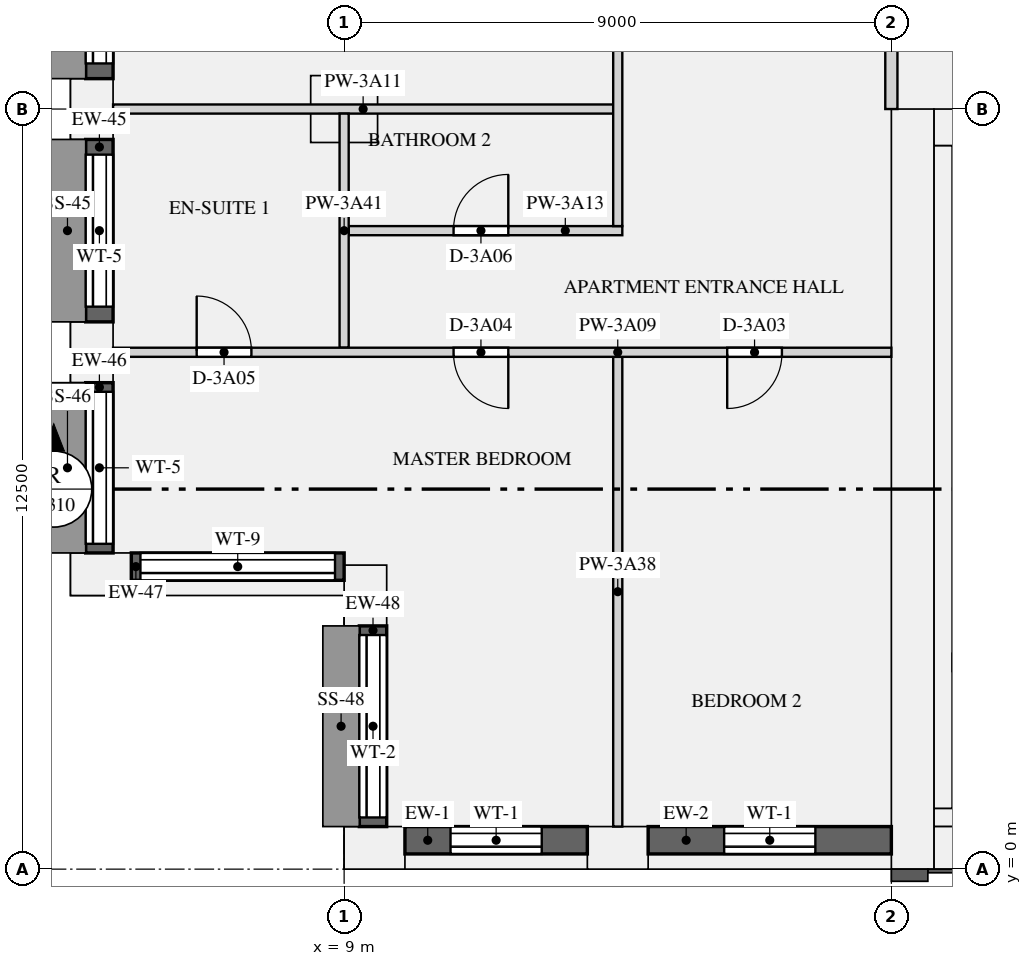
"""IFC4 building model, lengths in metres.
Left out: names, types, materials, properties, quantities, classifications, styles, units other than length and angle.
Written with IfcOpenShell. Run it as: python <this file> out.ifc"""

import sys

from ifc_helpers import new_model, si_unit, direction, frame, frame_2d, origin, origin_2d, place, context, subcontext, project, spatial, rectangle, extrude, element, fill, save


model = new_model("IFC4")
c1 = context("Model", 3, precision=1e-05, world=origin(), true_north=direction((0.0, 1.0)))
c2 = subcontext(c1, "Body", "Model", "MODEL_VIEW")
j1 = project(units=[si_unit("LENGTHUNIT", "METRE"), si_unit("PLANEANGLEUNIT", "RADIAN")], contexts=[c1])
p1 = place(None, origin())
s1 = spatial("IfcSite", under=j1, at=p1, CompositionType="ELEMENT")
p2 = place(p1, origin())
s2 = spatial("IfcBuilding", under=s1, at=p2, CompositionType="ELEMENT")
p3 = place(p2, frame((0.0, 0.0, 144.45)))
s3 = spatial("IfcBuildingStorey", under=s2, at=p3, CompositionType="ELEMENT", Elevation=144.45)
for number, where, z_axis, x_axis in (
    (1, (9.5, 0.35, 0.0), (0.0, 0.0, 1.0), (1.0, 0.0, 0.0)),
    (2, (13.5, 0.35, 0.0), (0.0, 0.0, 1.0), (1.0, 0.0, 0.0)),
    (3, (4.85, 12.5, 0.0), (0.0, 0.0, 1.0), (0.0, -1.0, 0.0)),
    (4, (4.85, 8.5, 0.0), (0.0, 0.0, 1.0), (0.0, -1.0, 0.0)),
    (5, (5.0, 4.85, 0.0), (0.0, 0.0, 1.0), (1.0, 0.0, 0.0)),
    (6, (9.35, 4.5, 0.0), (0.0, 0.0, 1.0), (0.0, -1.0, 0.0)),
):
    element("IfcColumn", number, at=place(p3, frame(where, z_axis=z_axis, x_axis=x_axis)), inside=s3, PredefinedType="USERDEFINED", context=c2, shape_type="SweptSolid", body=[
        extrude(rectangle(XDim=1.0, YDim=0.7, at=origin_2d()), origin(), (0.0, 0.0, 1.0), 3.15),
    ])
p4 = place(p3, frame((9.0, 12.5, 0.0), z_axis=(0.0, 0.0, 1.0), x_axis=(1.0, 0.0, 0.0)))
e7 = element("IfcColumn", 7, at=p4, inside=s3, PredefinedType="COLUMN", context=c2, shape_type="SweptSolid", body=[
    extrude(rectangle(XDim=1.1, YDim=1.1, at=origin_2d()), origin(), (0.0, 0.0, 1.0), 3.15),
])
p5 = place(p3, frame((18.35, 0.0, 0.0), z_axis=(0.0, 0.0, 1.0), x_axis=(0.0, 1.0, 0.0)))
e8 = element("IfcWall", 8, at=p5, inside=s3, PredefinedType="SHEAR", context=c2, shape_type="SweptSolid", body=[
    extrude(rectangle(XDim=12.5, YDim=0.7, at=frame_2d((6.25, 0.0))), origin(), (0.0, 0.0, 1.0), 3.15),
])
p6 = place(p3, frame((18.7, 0.35, 0.0), z_axis=(0.0, 0.0, 1.0), x_axis=(1.0, 0.0, 0.0)))
e9 = element("IfcWall", 9, at=p6, inside=s3, PredefinedType="SHEAR", context=c2, shape_type="SweptSolid", body=[
    extrude(rectangle(XDim=34.6, YDim=0.7, at=frame_2d((17.3, 0.0))), origin(), (0.0, 0.0, 1.0), 3.15),
])
p7 = place(p3, frame((18.7, 12.2, 0.0), z_axis=(0.0, 0.0, 1.0), x_axis=(1.0, 0.0, 0.0)))
e10 = element("IfcWall", 10, at=p7, inside=s3, PredefinedType="SHEAR", context=c2, shape_type="SweptSolid", body=[
    extrude(rectangle(XDim=34.6, YDim=0.6, at=frame_2d((17.3, 0.0))), origin(), (0.0, 0.0, 1.0), 3.15),
])
p8 = place(p7, frame((24.475, 0.0, 0.0)))
e11 = element("IfcOpeningElement", 11, at=p8, cuts=e10, PredefinedType="OPENING", context=c2, shape_type="SweptSolid", body=[
    extrude(rectangle(XDim=1.1, YDim=2.1, at=frame_2d((0.55, 1.05))), frame((0.0, 0.31, 0.0), z_axis=(0.0, -1.0, 0.0), x_axis=(1.0, 0.0, 0.0)), (0.0, 0.0, 1.0), 0.62),
])
p9 = place(p7, frame((26.725, 0.0, 0.0)))
e12 = element("IfcOpeningElement", 12, at=p9, cuts=e10, PredefinedType="OPENING", context=c2, shape_type="SweptSolid", body=[
    extrude(rectangle(XDim=1.1, YDim=2.1, at=frame_2d((0.55, 1.05))), frame((0.0, 0.31, 0.0), z_axis=(0.0, -1.0, 0.0), x_axis=(1.0, 0.0, 0.0)), (0.0, 0.0, 1.0), 0.62),
])
p10 = place(p7, frame((28.975, 0.0, 0.0)))
e13 = element("IfcOpeningElement", 13, at=p10, cuts=e10, PredefinedType="OPENING", context=c2, shape_type="SweptSolid", body=[
    extrude(rectangle(XDim=1.1, YDim=2.1, at=frame_2d((0.55, 1.05))), frame((0.0, 0.31, 0.0), z_axis=(0.0, -1.0, 0.0), x_axis=(1.0, 0.0, 0.0)), (0.0, 0.0, 1.0), 0.62),
])
p11 = place(p7, frame((14.35, 0.0, 0.0)))
e14 = element("IfcOpeningElement", 14, at=p11, cuts=e10, PredefinedType="OPENING", context=c2, shape_type="SweptSolid", body=[
    extrude(rectangle(XDim=0.9, YDim=2.1, at=frame_2d((0.45, 1.05))), frame((0.0, 0.31, 0.0), z_axis=(0.0, -1.0, 0.0), x_axis=(1.0, 0.0, 0.0)), (0.0, 0.0, 1.0), 0.62),
])
p12 = place(p7, frame((1.45, 0.0, 0.0)))
e15 = element("IfcOpeningElement", 15, at=p12, cuts=e10, PredefinedType="OPENING", context=c2, shape_type="SweptSolid", body=[
    extrude(rectangle(XDim=1.2, YDim=2.1, at=frame_2d((0.6, 1.05))), frame((0.0, 0.31, 0.0), z_axis=(0.0, -1.0, 0.0), x_axis=(1.0, 0.0, 0.0)), (0.0, 0.0, 1.0), 0.62),
])
p13 = place(p7, frame((31.95, 0.0, 0.0)))
e16 = element("IfcOpeningElement", 16, at=p13, cuts=e10, PredefinedType="OPENING", context=c2, shape_type="SweptSolid", body=[
    extrude(rectangle(XDim=1.2, YDim=2.1, at=frame_2d((0.6, 1.05))), frame((0.0, 0.31, 0.0), z_axis=(0.0, -1.0, 0.0), x_axis=(1.0, 0.0, 0.0)), (0.0, 0.0, 1.0), 0.62),
])
p14 = place(p3, frame((18.85, 1.0, 0.0), z_axis=(0.0, 0.0, 1.0), x_axis=(0.0, 1.0, 0.0)))
e17 = element("IfcWall", 17, at=p14, inside=s3, PredefinedType="SHEAR", context=c2, shape_type="SweptSolid", body=[
    extrude(rectangle(XDim=10.9, YDim=0.3, at=frame_2d((5.45, 0.0))), origin(), (0.0, 0.0, 1.0), 3.15),
])
p15 = place(p3, frame((18.7, 0.85, 0.0), z_axis=(0.0, 0.0, 1.0), x_axis=(1.0, 0.0, 0.0)))
e18 = element("IfcWall", 18, at=p15, inside=s3, PredefinedType="SHEAR", context=c2, shape_type="SweptSolid", body=[
    extrude(rectangle(XDim=34.6, YDim=0.3, at=frame_2d((17.3, 0.0))), origin(), (0.0, 0.0, 1.0), 3.15),
])
p16 = place(p3, frame((19.0, 3.4, 0.0), z_axis=(0.0, 0.0, 1.0), x_axis=(1.0, 0.0, 0.0)))
e19 = element("IfcWall", 19, at=p16, inside=s3, PredefinedType="SHEAR", context=c2, shape_type="SweptSolid", body=[
    extrude(rectangle(XDim=2.55, YDim=0.3, at=frame_2d((1.275, 0.0))), origin(), (0.0, 0.0, 1.0), 3.15),
])
p17 = place(p16, frame((0.675, 0.0, 0.0)))
e20 = element("IfcOpeningElement", 20, at=p17, cuts=e19, PredefinedType="OPENING", context=c2, shape_type="SweptSolid", body=[
    extrude(rectangle(XDim=1.2, YDim=2.1, at=frame_2d((0.6, 1.05))), frame((0.0, 0.16, 0.0), z_axis=(0.0, -1.0, 0.0), x_axis=(1.0, 0.0, 0.0)), (0.0, 0.0, 1.0), 0.32),
])
p18 = place(p3, frame((10.0, 0.475, 0.9), z_axis=(0.0, 0.0, 1.0), x_axis=(1.0, 0.0, 0.0)))
e21 = element("IfcWall", 21, at=p18, inside=s3, PredefinedType="SOLIDWALL", context=c2, shape_type="SweptSolid", body=[
    extrude(rectangle(XDim=3.0, YDim=0.45, at=frame_2d((1.5, 0.0))), origin(), (0.0, 0.0, 1.0), 1.93),
])
p19 = place(p18, frame((0.75, 0.0, 0.15)))
e22 = element("IfcOpeningElement", 22, at=p19, cuts=e21, PredefinedType="OPENING", context=c2, shape_type="SweptSolid", body=[
    extrude(rectangle(XDim=1.5, YDim=1.5, at=frame_2d((0.75, 0.75))), frame((0.0, 0.235, 0.0), z_axis=(0.0, -1.0, 0.0), x_axis=(1.0, 0.0, 0.0)), (0.0, 0.0, 1.0), 0.47),
])
p20 = place(p3, frame((14.0, 0.475, 0.9), z_axis=(0.0, 0.0, 1.0), x_axis=(1.0, 0.0, 0.0)))
e23 = element("IfcWall", 23, at=p20, inside=s3, PredefinedType="SOLIDWALL", context=c2, shape_type="SweptSolid", body=[
    extrude(rectangle(XDim=4.0, YDim=0.45, at=frame_2d((2.0, 0.0))), origin(), (0.0, 0.0, 1.0), 1.93),
])
p21 = place(p20, frame((1.25, 0.0, 0.15)))
e24 = element("IfcOpeningElement", 24, at=p21, cuts=e23, PredefinedType="OPENING", context=c2, shape_type="SweptSolid", body=[
    extrude(rectangle(XDim=1.5, YDim=1.5, at=frame_2d((0.75, 0.75))), frame((0.0, 0.235, 0.0), z_axis=(0.0, -1.0, 0.0), x_axis=(1.0, 0.0, 0.0)), (0.0, 0.0, 1.0), 0.47),
])
p22 = place(p3, frame((4.975, 15.5, 0.9), z_axis=(0.0, 0.0, 1.0), x_axis=(0.0, -1.0, 0.0)))
e25 = element("IfcWall", 25, at=p22, inside=s3, PredefinedType="SOLIDWALL", context=c2, shape_type="SweptSolid", body=[
    extrude(rectangle(XDim=2.5, YDim=0.45, at=frame_2d((1.25, 0.0))), origin(), (0.0, 0.0, 1.0), 1.93),
])
p23 = place(p22, frame((0.25, 0.0, 0.15)))
e26 = element("IfcOpeningElement", 26, at=p23, cuts=e25, PredefinedType="OPENING", context=c2, shape_type="SweptSolid", body=[
    extrude(rectangle(XDim=2.0, YDim=1.5, at=frame_2d((1.0, 0.75))), frame((0.0, 0.235, 0.0), z_axis=(0.0, -1.0, 0.0), x_axis=(1.0, 0.0, 0.0)), (0.0, 0.0, 1.0), 0.47),
])
p24 = place(p3, frame((4.975, 12.0, 0.9), z_axis=(0.0, 0.0, 1.0), x_axis=(0.0, -1.0, 0.0)))
e27 = element("IfcWall", 27, at=p24, inside=s3, PredefinedType="SOLIDWALL", context=c2, shape_type="SweptSolid", body=[
    extrude(rectangle(XDim=3.0, YDim=0.45, at=frame_2d((1.5, 0.0))), origin(), (0.0, 0.0, 1.0), 1.93),
])
p25 = place(p24, frame((0.25, 0.0, 0.15)))
e28 = element("IfcOpeningElement", 28, at=p25, cuts=e27, PredefinedType="OPENING", context=c2, shape_type="SweptSolid", body=[
    extrude(rectangle(XDim=2.5, YDim=1.5, at=frame_2d((1.25, 0.75))), frame((0.0, 0.235, 0.0), z_axis=(0.0, -1.0, 0.0), x_axis=(1.0, 0.0, 0.0)), (0.0, 0.0, 1.0), 0.47),
])
p26 = place(p3, frame((4.975, 8.0, 0.9), z_axis=(0.0, 0.0, 1.0), x_axis=(0.0, -1.0, 0.0)))
e29 = element("IfcWall", 29, at=p26, inside=s3, PredefinedType="SOLIDWALL", context=c2, shape_type="SweptSolid", body=[
    extrude(rectangle(XDim=2.8, YDim=0.45, at=frame_2d((1.4, 0.0))), origin(), (0.0, 0.0, 1.0), 1.93),
])
p27 = place(p26, frame((0.15, 0.0, 0.15)))
e30 = element("IfcOpeningElement", 30, at=p27, cuts=e29, PredefinedType="OPENING", context=c2, shape_type="SweptSolid", body=[
    extrude(rectangle(XDim=2.5, YDim=1.5, at=frame_2d((1.25, 0.75))), frame((0.0, 0.235, 0.0), z_axis=(0.0, -1.0, 0.0), x_axis=(1.0, 0.0, 0.0)), (0.0, 0.0, 1.0), 0.47),
])
p28 = place(p3, frame((5.5, 4.975, 0.9), z_axis=(0.0, 0.0, 1.0), x_axis=(1.0, 0.0, 0.0)))
e31 = element("IfcWall", 31, at=p28, inside=s3, PredefinedType="SOLIDWALL", context=c2, shape_type="SweptSolid", body=[
    extrude(rectangle(XDim=3.5, YDim=0.45, at=frame_2d((1.75, 0.0))), origin(), (0.0, 0.0, 1.0), 1.93),
])
p29 = place(p28, frame((0.15, 0.0, 0.15)))
e32 = element("IfcOpeningElement", 32, at=p29, cuts=e31, PredefinedType="OPENING", context=c2, shape_type="SweptSolid", body=[
    extrude(rectangle(XDim=3.2, YDim=1.5, at=frame_2d((1.6, 0.75))), frame((0.0, 0.235, 0.0), z_axis=(0.0, -1.0, 0.0), x_axis=(1.0, 0.0, 0.0)), (0.0, 0.0, 1.0), 0.47),
])
p30 = place(p3, frame((9.475, 4.0, 0.9), z_axis=(0.0, 0.0, 1.0), x_axis=(0.0, -1.0, 0.0)))
e33 = element("IfcWall", 33, at=p30, inside=s3, PredefinedType="SOLIDWALL", context=c2, shape_type="SweptSolid", body=[
    extrude(rectangle(XDim=3.3, YDim=0.45, at=frame_2d((1.65, 0.0))), origin(), (0.0, 0.0, 1.0), 1.93),
])
p31 = place(p30, frame((0.15, 0.0, 0.15)))
e34 = element("IfcOpeningElement", 34, at=p31, cuts=e33, PredefinedType="OPENING", context=c2, shape_type="SweptSolid", body=[
    extrude(rectangle(XDim=3.0, YDim=1.5, at=frame_2d((1.5, 0.75))), frame((0.0, 0.235, 0.0), z_axis=(0.0, -1.0, 0.0), x_axis=(1.0, 0.0, 0.0)), (0.0, 0.0, 1.0), 0.47),
])
p32 = place(p3, frame((18.0, 12.5, 0.0), z_axis=(0.0, 0.0, 1.0), x_axis=(0.0, 1.0, 0.0)))
e35 = element("IfcWall", 35, at=p32, inside=s3, PredefinedType="PARTITIONING", context=c2, shape_type="SweptSolid", body=[
    extrude(rectangle(XDim=3.4, YDim=0.2, at=frame_2d((1.7, 0.0))), origin(), (0.0, 0.0, 1.0), 2.83),
])
p33 = place(p3, frame((5.2, 8.5, 0.0), z_axis=(0.0, 0.0, 1.0), x_axis=(1.0, 0.0, 0.0)))
e36 = element("IfcWall", 36, at=p33, inside=s3, PredefinedType="PARTITIONING", context=c2, shape_type="SweptSolid", body=[
    extrude(rectangle(XDim=12.8, YDim=0.15, at=frame_2d((6.4, 0.0))), origin(), (0.0, 0.0, 1.0), 2.83),
])
p34 = place(p33, frame((10.1, 0.0, 0.0)))
e37 = element("IfcOpeningElement", 37, at=p34, cuts=e36, PredefinedType="OPENING", context=c2, shape_type="SweptSolid", body=[
    extrude(rectangle(XDim=0.9, YDim=2.1, at=frame_2d((0.45, 1.05))), frame((0.0, 0.085, 0.0), z_axis=(0.0, -1.0, 0.0), x_axis=(1.0, 0.0, 0.0)), (0.0, 0.0, 1.0), 0.17),
])
p35 = place(p33, frame((5.6, 0.0, 0.0)))
e38 = element("IfcOpeningElement", 38, at=p35, cuts=e36, PredefinedType="OPENING", context=c2, shape_type="SweptSolid", body=[
    extrude(rectangle(XDim=0.9, YDim=2.1, at=frame_2d((0.45, 1.05))), frame((0.0, 0.085, 0.0), z_axis=(0.0, -1.0, 0.0), x_axis=(1.0, 0.0, 0.0)), (0.0, 0.0, 1.0), 0.17),
])
p36 = place(p33, frame((1.375, 0.0, 0.0)))
e39 = element("IfcOpeningElement", 39, at=p36, cuts=e36, PredefinedType="OPENING", context=c2, shape_type="SweptSolid", body=[
    extrude(rectangle(XDim=0.9, YDim=2.1, at=frame_2d((0.45, 1.05))), frame((0.0, 0.085, 0.0), z_axis=(0.0, -1.0, 0.0), x_axis=(1.0, 0.0, 0.0)), (0.0, 0.0, 1.0), 0.17),
])
p37 = place(p3, frame((5.2, 12.5, 0.0), z_axis=(0.0, 0.0, 1.0), x_axis=(1.0, 0.0, 0.0)))
e40 = element("IfcWall", 40, at=p37, inside=s3, PredefinedType="PARTITIONING", context=c2, shape_type="SweptSolid", body=[
    extrude(rectangle(XDim=8.225, YDim=0.15, at=frame_2d((4.113, 0.0))), origin(), (0.0, 0.0, 1.0), 2.83),
])
p38 = place(p3, frame((9.075, 10.5, 0.0), z_axis=(0.0, 0.0, 1.0), x_axis=(1.0, 0.0, 0.0)))
e41 = element("IfcWall", 41, at=p38, inside=s3, PredefinedType="PARTITIONING", context=c2, shape_type="SweptSolid", body=[
    extrude(rectangle(XDim=4.5, YDim=0.15, at=frame_2d((2.25, 0.0))), origin(), (0.0, 0.0, 1.0), 2.83),
])
p39 = place(p38, frame((1.725, 0.0, 0.0)))
e42 = element("IfcOpeningElement", 42, at=p39, cuts=e41, PredefinedType="OPENING", context=c2, shape_type="SweptSolid", body=[
    extrude(rectangle(XDim=0.9, YDim=2.1, at=frame_2d((0.45, 1.05))), frame((0.0, 0.085, 0.0), z_axis=(0.0, -1.0, 0.0), x_axis=(1.0, 0.0, 0.0)), (0.0, 0.0, 1.0), 0.17),
])
p40 = place(p3, frame((13.5, 0.7, 0.0), z_axis=(0.0, 0.0, 1.0), x_axis=(0.0, 1.0, 0.0)))
e43 = element("IfcWall", 43, at=p40, inside=s3, PredefinedType="PARTITIONING", context=c2, shape_type="SweptSolid", body=[
    extrude(rectangle(XDim=7.725, YDim=0.15, at=frame_2d((3.863, 0.0))), origin(), (0.0, 0.0, 1.0), 2.83),
])
p41 = place(p3, frame((13.5, 10.575, 0.0), z_axis=(0.0, 0.0, 1.0), x_axis=(0.0, 1.0, 0.0)))
e44 = element("IfcWall", 44, at=p41, inside=s3, PredefinedType="PARTITIONING", context=c2, shape_type="SweptSolid", body=[
    extrude(rectangle(XDim=12.325, YDim=0.15, at=frame_2d((6.163, 0.0))), origin(), (0.0, 0.0, 1.0), 2.83),
])
p42 = place(p41, frame((3.475, 0.0, 0.0)))
e45 = element("IfcOpeningElement", 45, at=p42, cuts=e44, PredefinedType="OPENING", context=c2, shape_type="SweptSolid", body=[
    extrude(rectangle(XDim=0.9, YDim=2.1, at=frame_2d((0.45, 1.05))), frame((0.0, 0.085, 0.0), z_axis=(0.0, -1.0, 0.0), x_axis=(1.0, 0.0, 0.0)), (0.0, 0.0, 1.0), 0.17),
])
p43 = place(p41, frame((8.45, 0.0, 0.0)))
e46 = element("IfcOpeningElement", 46, at=p43, cuts=e44, PredefinedType="OPENING", context=c2, shape_type="SweptSolid", body=[
    extrude(rectangle(XDim=1.5, YDim=2.1, at=frame_2d((0.75, 1.05))), frame((0.0, 0.085, 0.0), z_axis=(0.0, -1.0, 0.0), x_axis=(1.0, 0.0, 0.0)), (0.0, 0.0, 1.0), 0.17),
])
p44 = place(p3, frame((9.0, 8.575, 0.0), z_axis=(0.0, 0.0, 1.0), x_axis=(0.0, 1.0, 0.0)))
e47 = element("IfcWall", 47, at=p44, inside=s3, PredefinedType="PARTITIONING", context=c2, shape_type="SweptSolid", body=[
    extrude(rectangle(XDim=3.85, YDim=0.15, at=frame_2d((1.925, 0.0))), origin(), (0.0, 0.0, 1.0), 2.83),
])
p45 = place(p19, origin())
e48 = element("IfcWindow", 48, at=p45, inside=s3, PartitioningType="SINGLE_PANEL", PredefinedType="WINDOW", context=c2, shape_type="SweptSolid", body=[
    extrude(rectangle(XDim=1.5, YDim=1.5, at=frame_2d((0.75, 0.75))), frame((0.0, -0.065, 0.0), z_axis=(0.0, -1.0, 0.0), x_axis=(1.0, 0.0, 0.0)), (0.0, 0.0, 1.0), 0.06),
])
fill(e22, e48)
p46 = place(p21, origin())
e49 = element("IfcWindow", 49, at=p46, inside=s3, PartitioningType="SINGLE_PANEL", PredefinedType="WINDOW", context=c2, shape_type="SweptSolid", body=[
    extrude(rectangle(XDim=1.5, YDim=1.5, at=frame_2d((0.75, 0.75))), frame((0.0, -0.065, 0.0), z_axis=(0.0, -1.0, 0.0), x_axis=(1.0, 0.0, 0.0)), (0.0, 0.0, 1.0), 0.06),
])
fill(e24, e49)
p47 = place(p23, origin())
e50 = element("IfcWindow", 50, at=p47, inside=s3, PartitioningType="SINGLE_PANEL", PredefinedType="WINDOW", context=c2, shape_type="SweptSolid", body=[
    extrude(rectangle(XDim=2.0, YDim=1.5, at=frame_2d((1.0, 0.75))), frame((0.0, -0.065, 0.0), z_axis=(0.0, -1.0, 0.0), x_axis=(1.0, 0.0, 0.0)), (0.0, 0.0, 1.0), 0.06),
])
fill(e26, e50)
p48 = place(p25, origin())
e51 = element("IfcWindow", 51, at=p48, inside=s3, PartitioningType="SINGLE_PANEL", PredefinedType="WINDOW", context=c2, shape_type="SweptSolid", body=[
    extrude(rectangle(XDim=2.5, YDim=1.5, at=frame_2d((1.25, 0.75))), frame((0.0, -0.065, 0.0), z_axis=(0.0, -1.0, 0.0), x_axis=(1.0, 0.0, 0.0)), (0.0, 0.0, 1.0), 0.06),
])
fill(e28, e51)
p49 = place(p27, origin())
e52 = element("IfcWindow", 52, at=p49, inside=s3, PartitioningType="SINGLE_PANEL", PredefinedType="WINDOW", context=c2, shape_type="SweptSolid", body=[
    extrude(rectangle(XDim=2.5, YDim=1.5, at=frame_2d((1.25, 0.75))), frame((0.0, -0.065, 0.0), z_axis=(0.0, -1.0, 0.0), x_axis=(1.0, 0.0, 0.0)), (0.0, 0.0, 1.0), 0.06),
])
fill(e30, e52)
p50 = place(p29, origin())
e53 = element("IfcWindow", 53, at=p50, inside=s3, PartitioningType="SINGLE_PANEL", PredefinedType="WINDOW", context=c2, shape_type="SweptSolid", body=[
    extrude(rectangle(XDim=3.2, YDim=1.5, at=frame_2d((1.6, 0.75))), frame((0.0, -0.065, 0.0), z_axis=(0.0, -1.0, 0.0), x_axis=(1.0, 0.0, 0.0)), (0.0, 0.0, 1.0), 0.06),
])
fill(e32, e53)
p51 = place(p31, origin())
e54 = element("IfcWindow", 54, at=p51, inside=s3, PartitioningType="SINGLE_PANEL", PredefinedType="WINDOW", context=c2, shape_type="SweptSolid", body=[
    extrude(rectangle(XDim=3.0, YDim=1.5, at=frame_2d((1.5, 0.75))), frame((0.0, -0.065, 0.0), z_axis=(0.0, -1.0, 0.0), x_axis=(1.0, 0.0, 0.0)), (0.0, 0.0, 1.0), 0.06),
])
fill(e34, e54)
p52 = place(p34, frame((0.9, 0.0, 0.0), z_axis=(0.0, 0.0, 1.0), x_axis=(-1.0, 0.0, 0.0)))
e55 = element("IfcDoor", 55, at=p52, inside=s3, OperationType="SINGLE_SWING_RIGHT", PredefinedType="DOOR", context=c2, shape_type="SweptSolid", body=[
    extrude(rectangle(XDim=0.9, YDim=2.1, at=frame_2d((0.45, 1.05))), frame((0.0, 0.025, 0.0), z_axis=(0.0, -1.0, 0.0), x_axis=(1.0, 0.0, 0.0)), (0.0, 0.0, 1.0), 0.05),
])
fill(e37, e55)
p53 = place(p35, frame((0.9, 0.0, 0.0), z_axis=(0.0, 0.0, 1.0), x_axis=(-1.0, 0.0, 0.0)))
e56 = element("IfcDoor", 56, at=p53, inside=s3, OperationType="SINGLE_SWING_LEFT", PredefinedType="DOOR", context=c2, shape_type="SweptSolid", body=[
    extrude(rectangle(XDim=0.9, YDim=2.1, at=frame_2d((0.45, 1.05))), frame((0.0, 0.025, 0.0), z_axis=(0.0, -1.0, 0.0), x_axis=(1.0, 0.0, 0.0)), (0.0, 0.0, 1.0), 0.05),
])
fill(e38, e56)
p54 = place(p36, origin())
e57 = element("IfcDoor", 57, at=p54, inside=s3, OperationType="SINGLE_SWING_LEFT", PredefinedType="DOOR", context=c2, shape_type="SweptSolid", body=[
    extrude(rectangle(XDim=0.9, YDim=2.1, at=frame_2d((0.45, 1.05))), frame((0.0, 0.025, 0.0), z_axis=(0.0, -1.0, 0.0), x_axis=(1.0, 0.0, 0.0)), (0.0, 0.0, 1.0), 0.05),
])
fill(e39, e57)
p55 = place(p39, origin())
e58 = element("IfcDoor", 58, at=p55, inside=s3, OperationType="SINGLE_SWING_RIGHT", PredefinedType="DOOR", context=c2, shape_type="SweptSolid", body=[
    extrude(rectangle(XDim=0.9, YDim=2.1, at=frame_2d((0.45, 1.05))), frame((0.0, 0.025, 0.0), z_axis=(0.0, -1.0, 0.0), x_axis=(1.0, 0.0, 0.0)), (0.0, 0.0, 1.0), 0.05),
])
fill(e42, e58)
save(model, sys.argv[1])
